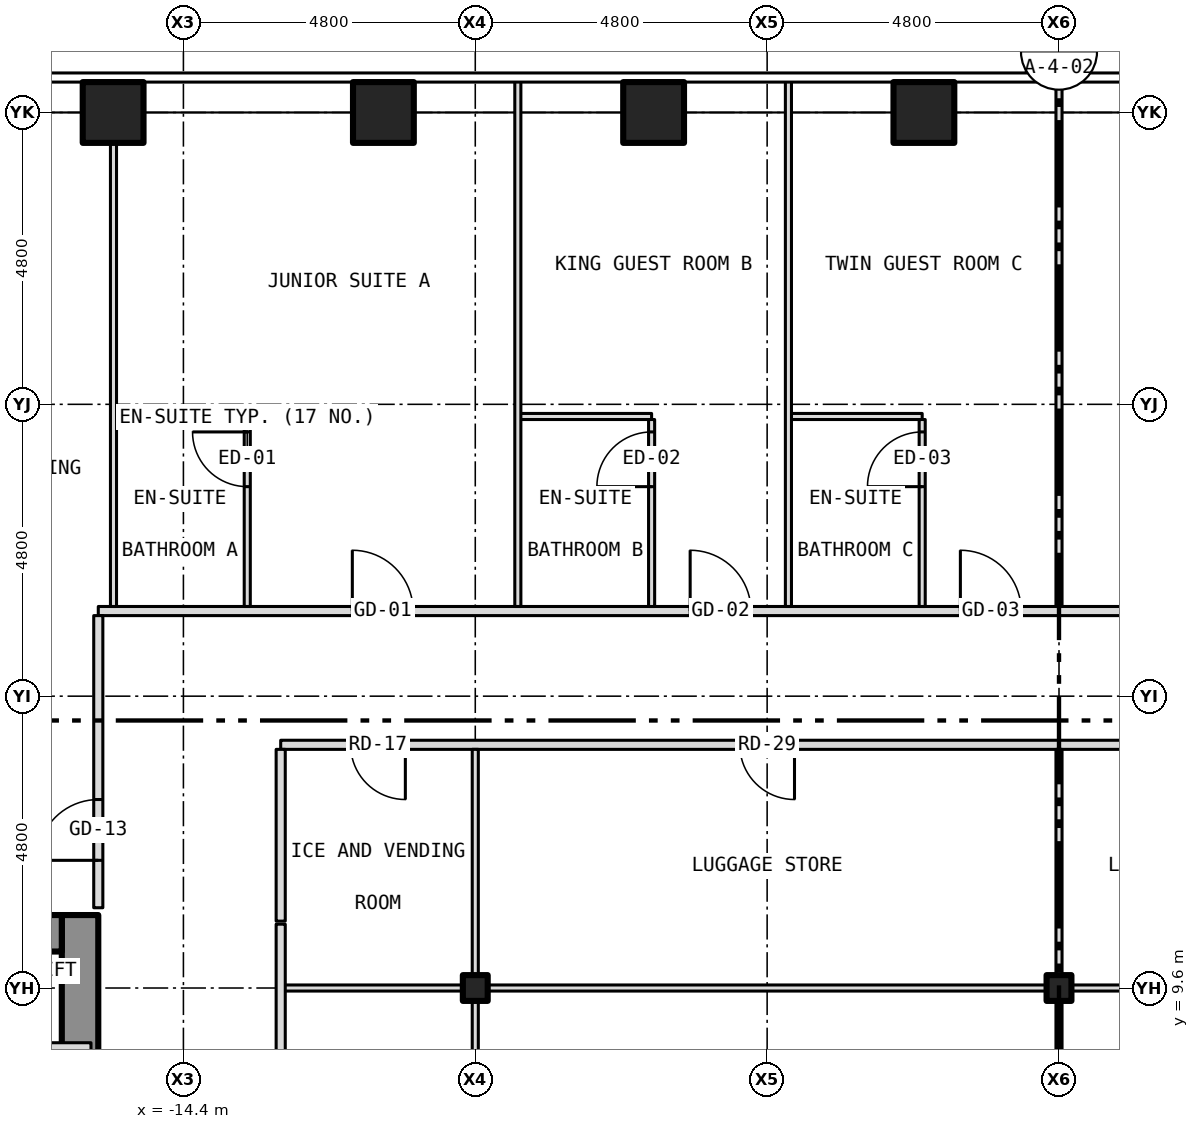
"""IFC4 building model, lengths in metres.
Left out: names, types, materials, properties, quantities, classifications, styles, units other than length and angle.
Written with IfcOpenShell. Run it as: python <this file> out.ifc"""

import sys

from ifc_helpers import new_model, si_unit, direction, frame, frame_2d, origin, origin_2d, place, context, subcontext, project, spatial, rectangle, hollow_rectangle, i_section, extrude, element, fill, save


model = new_model("IFC4")
c1 = context("Model", 3, precision=1e-05, world=origin(), true_north=direction((0.0, 1.0)))
c2 = subcontext(c1, "Body", "Model", "MODEL_VIEW")
j1 = project(units=[si_unit("LENGTHUNIT", "METRE"), si_unit("PLANEANGLEUNIT", "RADIAN")], contexts=[c1])
p1 = place(None, origin())
s1 = spatial("IfcSite", under=j1, at=p1, CompositionType="ELEMENT")
p2 = place(p1, origin())
s2 = spatial("IfcBuilding", under=s1, at=p2, CompositionType="ELEMENT")
p3 = place(p2, frame((0.0, 0.0, 56.5)))
s3 = spatial("IfcBuildingStorey", under=s2, at=p3, CompositionType="ELEMENT", Elevation=56.5)
for number, where, z_axis, x_axis in (
    (1, (-15.556, 24.0, -0.15), (0.0, 0.0, 1.0), (1.0, 0.0, 0.0)),
    (2, (-11.111, 24.0, -0.15), (0.0, 0.0, 1.0), (1.0, 0.0, 0.0)),
    (3, (-6.667, 24.0, -0.15), (0.0, 0.0, 1.0), (1.0, 0.0, 0.0)),
    (4, (-2.222, 24.0, -0.15), (0.0, 0.0, 1.0), (1.0, 0.0, 0.0)),
):
    element("IfcColumn", number, at=place(p3, frame(where, z_axis=z_axis, x_axis=x_axis)), inside=s3, PredefinedType="COLUMN", context=c2, shape_type="SweptSolid", body=[
        extrude(hollow_rectangle(XDim=1.0, YDim=1.0, WallThickness=0.06, at=origin_2d()), origin(), (0.0, 0.0, 1.0), 3.5),
    ])
for number, where, z_axis, x_axis in (
    (5, (-9.6, 9.6, -0.15), (0.0, 0.0, 1.0), (1.0, 0.0, 0.0)),
    (6, (0.0, 9.6, -0.15), (0.0, 0.0, 1.0), (1.0, 0.0, 0.0)),
):
    element("IfcColumn", number, at=place(p3, frame(where, z_axis=z_axis, x_axis=x_axis)), inside=s3, PredefinedType="COLUMN", context=c2, shape_type="SweptSolid", body=[
        extrude(i_section(OverallWidth=0.409, OverallDepth=0.424, WebThickness=0.033, FlangeThickness=0.052, at=origin_2d()), origin(), (0.0, 0.0, 1.0), 3.5),
    ])
p4 = place(p3, frame((-16.1, -10.8, 0.0), z_axis=(0.0, 0.0, 1.0), x_axis=(0.0, 1.0, 0.0)))
e7 = element("IfcWall", 7, at=p4, inside=s3, PredefinedType="SHEAR", context=c2, shape_type="SweptSolid", body=[
    extrude(rectangle(XDim=21.6, YDim=0.6, at=frame_2d((10.8, 0.0))), origin(), (0.0, 0.0, 1.0), 3.25),
])
p5 = place(p4, frame((9.4, 0.0, 0.0)))
e8 = element("IfcOpeningElement", 8, at=p5, cuts=e7, PredefinedType="OPENING", context=c2, shape_type="SweptSolid", body=[
    extrude(rectangle(XDim=1.1, YDim=2.1, at=frame_2d((0.55, 1.05))), frame((0.0, 0.312, 0.0), z_axis=(0.0, -1.0, 0.0), x_axis=(1.0, 0.0, 0.0)), (0.0, 0.0, 1.0), 0.624),
])
p6 = place(p4, frame((11.5, 0.0, 0.0)))
e9 = element("IfcOpeningElement", 9, at=p6, cuts=e7, PredefinedType="OPENING", context=c2, shape_type="SweptSolid", body=[
    extrude(rectangle(XDim=1.1, YDim=2.1, at=frame_2d((0.55, 1.05))), frame((0.0, 0.312, 0.0), z_axis=(0.0, -1.0, 0.0), x_axis=(1.0, 0.0, 0.0)), (0.0, 0.0, 1.0), 0.624),
])
p7 = place(p4, frame((13.6, 0.0, 0.0)))
e10 = element("IfcOpeningElement", 10, at=p7, cuts=e7, PredefinedType="OPENING", context=c2, shape_type="SweptSolid", body=[
    extrude(rectangle(XDim=1.1, YDim=2.1, at=frame_2d((0.55, 1.05))), frame((0.0, 0.312, 0.0), z_axis=(0.0, -1.0, 0.0), x_axis=(1.0, 0.0, 0.0)), (0.0, 0.0, 1.0), 0.624),
])
p8 = place(p4, frame((15.7, 0.0, 0.0)))
e11 = element("IfcOpeningElement", 11, at=p8, cuts=e7, PredefinedType="OPENING", context=c2, shape_type="SweptSolid", body=[
    extrude(rectangle(XDim=1.1, YDim=2.1, at=frame_2d((0.55, 1.05))), frame((0.0, 0.312, 0.0), z_axis=(0.0, -1.0, 0.0), x_axis=(1.0, 0.0, 0.0)), (0.0, 0.0, 1.0), 0.624),
])
p9 = place(p4, frame((17.8, 0.0, 0.0)))
e12 = element("IfcOpeningElement", 12, at=p9, cuts=e7, PredefinedType="OPENING", context=c2, shape_type="SweptSolid", body=[
    extrude(rectangle(XDim=1.1, YDim=2.1, at=frame_2d((0.55, 1.05))), frame((0.0, 0.312, 0.0), z_axis=(0.0, -1.0, 0.0), x_axis=(1.0, 0.0, 0.0)), (0.0, 0.0, 1.0), 0.624),
])
p10 = place(p4, frame((0.758, 0.0, 0.0)))
e13 = element("IfcOpeningElement", 13, at=p10, cuts=e7, PredefinedType="OPENING", context=c2, shape_type="SweptSolid", body=[
    extrude(rectangle(XDim=1.1, YDim=2.1, at=frame_2d((0.55, 1.05))), frame((0.0, 0.312, 0.0), z_axis=(0.0, -1.0, 0.0), x_axis=(1.0, 0.0, 0.0)), (0.0, 0.0, 1.0), 0.624),
])
p11 = place(p4, frame((7.5, 0.0, 0.0)))
e14 = element("IfcOpeningElement", 14, at=p11, cuts=e7, PredefinedType="OPENING", context=c2, shape_type="SweptSolid", body=[
    extrude(rectangle(XDim=1.1, YDim=2.1, at=frame_2d((0.55, 1.05))), frame((0.0, 0.312, 0.0), z_axis=(0.0, -1.0, 0.0), x_axis=(1.0, 0.0, 0.0)), (0.0, 0.0, 1.0), 0.624),
])
p12 = place(p3, frame((-23.4, 10.5, 0.0), z_axis=(0.0, 0.0, 1.0), x_axis=(1.0, 0.0, 0.0)))
e15 = element("IfcWall", 15, at=p12, inside=s3, PredefinedType="SHEAR", context=c2, shape_type="SweptSolid", body=[
    extrude(rectangle(XDim=7.0, YDim=0.6, at=frame_2d((3.5, 0.0))), origin(), (0.0, 0.0, 1.0), 3.25),
])
p13 = place(p3, frame((-18.8, 8.6, 0.0), z_axis=(0.0, 0.0, 1.0), x_axis=(1.0, 0.0, 0.0)))
e16 = element("IfcWall", 16, at=p13, inside=s3, PredefinedType="PARTITIONING", context=c2, shape_type="SweptSolid", body=[
    extrude(rectangle(XDim=2.88, YDim=0.2, at=frame_2d((1.44, 0.0))), origin(), (0.0, 0.0, 1.0), 3.25),
])
p14 = place(p3, frame((-12.8, 9.6, 0.0), z_axis=(0.0, 0.0, 1.0), x_axis=(1.0, 0.0, 0.0)))
e17 = element("IfcWall", 17, at=p14, inside=s3, PredefinedType="PARTITIONING", context=c2, shape_type="SweptSolid", body=[
    extrude(rectangle(XDim=2.996, YDim=0.1, at=frame_2d((1.498, 0.0))), origin(), (0.0, 0.0, 1.0), 2.728),
])
p15 = place(p3, frame((-9.804, 9.6, 0.0), z_axis=(0.0, 0.0, 1.0), x_axis=(1.0, 0.0, 0.0)))
e18 = element("IfcWall", 18, at=p15, inside=s3, PredefinedType="PARTITIONING", context=c2, shape_type="SweptSolid", body=[
    extrude(rectangle(XDim=0.408, YDim=0.1, at=frame_2d((0.204, 0.0))), origin(), (0.0, 0.0, 1.0), 3.35),
])
p16 = place(p3, frame((-9.396, 9.6, 0.0), z_axis=(0.0, 0.0, 1.0), x_axis=(1.0, 0.0, 0.0)))
e19 = element("IfcWall", 19, at=p16, inside=s3, PredefinedType="PARTITIONING", context=c2, shape_type="SweptSolid", body=[
    extrude(rectangle(XDim=9.192, YDim=0.1, at=frame_2d((4.596, 0.0))), origin(), (0.0, 0.0, 1.0), 2.728),
])
p17 = place(p3, frame((-0.204, 9.6, 0.0), z_axis=(0.0, 0.0, 1.0), x_axis=(1.0, 0.0, 0.0)))
e20 = element("IfcWall", 20, at=p17, inside=s3, PredefinedType="PARTITIONING", context=c2, shape_type="SweptSolid", body=[
    extrude(rectangle(XDim=0.408, YDim=0.1, at=frame_2d((0.204, 0.0))), origin(), (0.0, 0.0, 1.0), 3.35),
])
p18 = place(p3, frame((0.204, 9.6, 0.0), z_axis=(0.0, 0.0, 1.0), x_axis=(1.0, 0.0, 0.0)))
e21 = element("IfcWall", 21, at=p18, inside=s3, PredefinedType="PARTITIONING", context=c2, shape_type="SweptSolid", body=[
    extrude(rectangle(XDim=3.896, YDim=0.1, at=frame_2d((1.948, 0.0))), origin(), (0.0, 0.0, 1.0), 2.728),
])
p19 = place(p3, frame((-12.8, 13.6, 0.0), z_axis=(0.0, 0.0, 1.0), x_axis=(1.0, 0.0, 0.0)))
e22 = element("IfcWall", 22, at=p19, inside=s3, PredefinedType="PARTITIONING", context=c2, shape_type="SweptSolid", body=[
    extrude(rectangle(XDim=16.9, YDim=0.15, at=frame_2d((8.45, 0.0))), origin(), (0.0, 0.0, 1.0), 3.35),
])
p20 = place(p19, frame((1.15, 0.0, 0.0)))
e23 = element("IfcOpeningElement", 23, at=p20, cuts=e22, PredefinedType="OPENING", context=c2, shape_type="SweptSolid", body=[
    extrude(rectangle(XDim=0.9, YDim=2.1, at=frame_2d((0.45, 1.05))), frame((0.0, 0.087, 0.0), z_axis=(0.0, -1.0, 0.0), x_axis=(1.0, 0.0, 0.0)), (0.0, 0.0, 1.0), 0.174),
])
p21 = place(p19, frame((14.4, 0.0, 0.0)))
e24 = element("IfcOpeningElement", 24, at=p21, cuts=e22, PredefinedType="OPENING", context=c2, shape_type="SweptSolid", body=[
    extrude(rectangle(XDim=0.9, YDim=2.1, at=frame_2d((0.45, 1.05))), frame((0.0, 0.087, 0.0), z_axis=(0.0, -1.0, 0.0), x_axis=(1.0, 0.0, 0.0)), (0.0, 0.0, 1.0), 0.174),
])
p22 = place(p19, frame((7.55, 0.0, 0.0)))
e25 = element("IfcOpeningElement", 25, at=p22, cuts=e22, PredefinedType="OPENING", context=c2, shape_type="SweptSolid", body=[
    extrude(rectangle(XDim=0.9, YDim=2.1, at=frame_2d((0.45, 1.05))), frame((0.0, 0.087, 0.0), z_axis=(0.0, -1.0, 0.0), x_axis=(1.0, 0.0, 0.0)), (0.0, 0.0, 1.0), 0.174),
])
p23 = place(p3, frame((-15.8, 15.8, 0.0), z_axis=(0.0, 0.0, 1.0), x_axis=(1.0, 0.0, 0.0)))
e26 = element("IfcWall", 26, at=p23, inside=s3, PredefinedType="PARTITIONING", context=c2, shape_type="SweptSolid", body=[
    extrude(rectangle(XDim=31.6, YDim=0.15, at=frame_2d((15.8, 0.0))), origin(), (0.0, 0.0, 1.0), 3.35),
])
p24 = place(p23, frame((4.178, 0.0, 0.0)))
e27 = element("IfcOpeningElement", 27, at=p24, cuts=e26, PredefinedType="OPENING", context=c2, shape_type="SweptSolid", body=[
    extrude(rectangle(XDim=1.0, YDim=2.1, at=frame_2d((0.5, 1.05))), frame((0.0, 0.087, 0.0), z_axis=(0.0, -1.0, 0.0), x_axis=(1.0, 0.0, 0.0)), (0.0, 0.0, 1.0), 0.174),
])
p25 = place(p23, frame((9.734, 0.0, 0.0)))
e28 = element("IfcOpeningElement", 28, at=p25, cuts=e26, PredefinedType="OPENING", context=c2, shape_type="SweptSolid", body=[
    extrude(rectangle(XDim=1.0, YDim=2.1, at=frame_2d((0.5, 1.05))), frame((0.0, 0.087, 0.0), z_axis=(0.0, -1.0, 0.0), x_axis=(1.0, 0.0, 0.0)), (0.0, 0.0, 1.0), 0.174),
])
p26 = place(p23, frame((14.178, 0.0, 0.0)))
e29 = element("IfcOpeningElement", 29, at=p26, cuts=e26, PredefinedType="OPENING", context=c2, shape_type="SweptSolid", body=[
    extrude(rectangle(XDim=1.0, YDim=2.1, at=frame_2d((0.5, 1.05))), frame((0.0, 0.087, 0.0), z_axis=(0.0, -1.0, 0.0), x_axis=(1.0, 0.0, 0.0)), (0.0, 0.0, 1.0), 0.174),
])
p27 = place(p23, frame((17.534, 0.0, 0.0)))
e30 = element("IfcOpeningElement", 30, at=p27, cuts=e26, PredefinedType="OPENING", context=c2, shape_type="SweptSolid", body=[
    extrude(rectangle(XDim=1.0, YDim=2.1, at=frame_2d((0.5, 1.05))), frame((0.0, 0.087, 0.0), z_axis=(0.0, -1.0, 0.0), x_axis=(1.0, 0.0, 0.0)), (0.0, 0.0, 1.0), 0.174),
])
p28 = place(p23, frame((25.289, 0.0, 0.0)))
e31 = element("IfcOpeningElement", 31, at=p28, cuts=e26, PredefinedType="OPENING", context=c2, shape_type="SweptSolid", body=[
    extrude(rectangle(XDim=1.0, YDim=2.1, at=frame_2d((0.5, 1.05))), frame((0.0, 0.087, 0.0), z_axis=(0.0, -1.0, 0.0), x_axis=(1.0, 0.0, 0.0)), (0.0, 0.0, 1.0), 0.174),
])
p29 = place(p23, frame((29.733, 0.0, 0.0)))
e32 = element("IfcOpeningElement", 32, at=p29, cuts=e26, PredefinedType="OPENING", context=c2, shape_type="SweptSolid", body=[
    extrude(rectangle(XDim=1.0, YDim=2.1, at=frame_2d((0.5, 1.05))), frame((0.0, 0.087, 0.0), z_axis=(0.0, -1.0, 0.0), x_axis=(1.0, 0.0, 0.0)), (0.0, 0.0, 1.0), 0.174),
])
for number, where, z_axis, x_axis in (
    (33, (-15.55, 19.0, 0.0), (0.0, 0.0, 1.0), (1.0, 0.0, 0.0)),
    (34, (-8.9, 19.0, 0.0), (0.0, 0.0, 1.0), (1.0, 0.0, 0.0)),
    (35, (-4.45, 19.0, 0.0), (0.0, 0.0, 1.0), (1.0, 0.0, 0.0)),
):
    element("IfcWall", number, at=place(p3, frame(where, z_axis=z_axis, x_axis=x_axis)), inside=s3, PredefinedType="PARTITIONING", context=c2, shape_type="SweptSolid", body=[
        extrude(rectangle(XDim=2.2, YDim=0.1, at=frame_2d((1.1, 0.0))), origin(), (0.0, 0.0, 1.0), 3.35),
    ])
p30 = place(p3, frame((-15.8, 10.92, 0.0), z_axis=(0.0, 0.0, 1.0), x_axis=(0.0, 1.0, 0.0)))
e36 = element("IfcWall", 36, at=p30, inside=s3, PredefinedType="PARTITIONING", context=c2, shape_type="SweptSolid", body=[
    extrude(rectangle(XDim=4.805, YDim=0.15, at=frame_2d((2.403, 0.0))), origin(), (0.0, 0.0, 1.0), 3.35),
])
p31 = place(p30, frame((0.78, 0.0, 0.0)))
e37 = element("IfcOpeningElement", 37, at=p31, cuts=e36, PredefinedType="OPENING", context=c2, shape_type="SweptSolid", body=[
    extrude(rectangle(XDim=1.0, YDim=2.1, at=frame_2d((0.5, 1.05))), frame((0.0, 0.087, 0.0), z_axis=(0.0, -1.0, 0.0), x_axis=(1.0, 0.0, 0.0)), (0.0, 0.0, 1.0), 0.174),
])
p32 = place(p3, frame((-15.55, 15.875, 0.0), z_axis=(0.0, 0.0, 1.0), x_axis=(0.0, 1.0, 0.0)))
e38 = element("IfcWall", 38, at=p32, inside=s3, PredefinedType="PARTITIONING", context=c2, shape_type="SweptSolid", body=[
    extrude(rectangle(XDim=8.005, YDim=0.1, at=frame_2d((4.002, 0.0))), origin(), (0.0, 0.0, 1.0), 3.35),
])
p33 = place(p3, frame((-13.35, 15.875, 0.0), z_axis=(0.0, 0.0, 1.0), x_axis=(0.0, 1.0, 0.0)))
e39 = element("IfcWall", 39, at=p33, inside=s3, PredefinedType="PARTITIONING", context=c2, shape_type="SweptSolid", body=[
    extrude(rectangle(XDim=3.075, YDim=0.1, at=frame_2d((1.538, 0.0))), origin(), (0.0, 0.0, 1.0), 3.35),
])
p34 = place(p33, frame((1.971, 0.0, 0.0)))
e40 = element("IfcOpeningElement", 40, at=p34, cuts=e39, PredefinedType="OPENING", context=c2, shape_type="SweptSolid", body=[
    extrude(rectangle(XDim=0.9, YDim=2.1, at=frame_2d((0.45, 1.05))), frame((0.0, 0.062, 0.0), z_axis=(0.0, -1.0, 0.0), x_axis=(1.0, 0.0, 0.0)), (0.0, 0.0, 1.0), 0.124),
])
p35 = place(p3, frame((-12.8, 6.35, 0.0), z_axis=(0.0, 0.0, 1.0), x_axis=(0.0, 1.0, 0.0)))
e41 = element("IfcWall", 41, at=p35, inside=s3, PredefinedType="PARTITIONING", context=c2, shape_type="SweptSolid", body=[
    extrude(rectangle(XDim=4.3, YDim=0.15, at=frame_2d((2.15, 0.0))), origin(), (0.0, 0.0, 1.0), 3.35),
])
p36 = place(p35, frame((1.15, 0.0, 0.0)))
e42 = element("IfcOpeningElement", 42, at=p36, cuts=e41, PredefinedType="OPENING", context=c2, shape_type="SweptSolid", body=[
    extrude(rectangle(XDim=0.9, YDim=2.1, at=frame_2d((0.45, 1.05))), frame((0.0, 0.087, 0.0), z_axis=(0.0, -1.0, 0.0), x_axis=(1.0, 0.0, 0.0)), (0.0, 0.0, 1.0), 0.174),
])
p37 = place(p3, frame((-12.8, 10.7, 0.0), z_axis=(0.0, 0.0, 1.0), x_axis=(0.0, 1.0, 0.0)))
e43 = element("IfcWall", 43, at=p37, inside=s3, PredefinedType="PARTITIONING", context=c2, shape_type="SweptSolid", body=[
    extrude(rectangle(XDim=2.825, YDim=0.15, at=frame_2d((1.413, 0.0))), origin(), (0.0, 0.0, 1.0), 3.35),
])
p38 = place(p3, frame((-9.6, 6.375, 0.0), z_axis=(0.0, 0.0, 1.0), x_axis=(0.0, 1.0, 0.0)))
e44 = element("IfcWall", 44, at=p38, inside=s3, PredefinedType="PARTITIONING", context=c2, shape_type="SweptSolid", body=[
    extrude(rectangle(XDim=3.175, YDim=0.1, at=frame_2d((1.587, 0.0))), origin(), (0.0, 0.0, 1.0), 2.728),
])
p39 = place(p3, frame((-9.6, 9.65, 0.0), z_axis=(0.0, 0.0, 1.0), x_axis=(0.0, 1.0, 0.0)))
e45 = element("IfcWall", 45, at=p39, inside=s3, PredefinedType="PARTITIONING", context=c2, shape_type="SweptSolid", body=[
    extrude(rectangle(XDim=3.875, YDim=0.1, at=frame_2d((1.938, 0.0))), origin(), (0.0, 0.0, 1.0), 2.728),
])
p40 = place(p3, frame((-8.9, 15.875, 0.0), z_axis=(0.0, 0.0, 1.0), x_axis=(0.0, 1.0, 0.0)))
e46 = element("IfcWall", 46, at=p40, inside=s3, PredefinedType="PARTITIONING", context=c2, shape_type="SweptSolid", body=[
    extrude(rectangle(XDim=8.655, YDim=0.1, at=frame_2d((4.328, 0.0))), origin(), (0.0, 0.0, 1.0), 3.35),
])
p41 = place(p3, frame((-6.7, 15.875, 0.0), z_axis=(0.0, 0.0, 1.0), x_axis=(0.0, 1.0, 0.0)))
e47 = element("IfcWall", 47, at=p41, inside=s3, PredefinedType="PARTITIONING", context=c2, shape_type="SweptSolid", body=[
    extrude(rectangle(XDim=3.075, YDim=0.1, at=frame_2d((1.538, 0.0))), origin(), (0.0, 0.0, 1.0), 3.35),
])
p42 = place(p41, frame((1.971, 0.0, 0.0)))
e48 = element("IfcOpeningElement", 48, at=p42, cuts=e47, PredefinedType="OPENING", context=c2, shape_type="SweptSolid", body=[
    extrude(rectangle(XDim=0.9, YDim=2.1, at=frame_2d((0.45, 1.05))), frame((0.0, 0.062, 0.0), z_axis=(0.0, -1.0, 0.0), x_axis=(1.0, 0.0, 0.0)), (0.0, 0.0, 1.0), 0.124),
])
p43 = place(p3, frame((-4.45, 15.875, 0.0), z_axis=(0.0, 0.0, 1.0), x_axis=(0.0, 1.0, 0.0)))
e49 = element("IfcWall", 49, at=p43, inside=s3, PredefinedType="PARTITIONING", context=c2, shape_type="SweptSolid", body=[
    extrude(rectangle(XDim=8.655, YDim=0.1, at=frame_2d((4.328, 0.0))), origin(), (0.0, 0.0, 1.0), 3.35),
])
p44 = place(p3, frame((-2.25, 15.875, 0.0), z_axis=(0.0, 0.0, 1.0), x_axis=(0.0, 1.0, 0.0)))
e50 = element("IfcWall", 50, at=p44, inside=s3, PredefinedType="PARTITIONING", context=c2, shape_type="SweptSolid", body=[
    extrude(rectangle(XDim=3.075, YDim=0.1, at=frame_2d((1.538, 0.0))), origin(), (0.0, 0.0, 1.0), 3.35),
])
p45 = place(p44, frame((1.971, 0.0, 0.0)))
e51 = element("IfcOpeningElement", 51, at=p45, cuts=e50, PredefinedType="OPENING", context=c2, shape_type="SweptSolid", body=[
    extrude(rectangle(XDim=0.9, YDim=2.1, at=frame_2d((0.45, 1.05))), frame((0.0, 0.062, 0.0), z_axis=(0.0, -1.0, 0.0), x_axis=(1.0, 0.0, 0.0)), (0.0, 0.0, 1.0), 0.124),
])
p46 = place(p3, frame((0.0, 6.375, 0.0), z_axis=(0.0, 0.0, 1.0), x_axis=(0.0, 1.0, 0.0)))
e52 = element("IfcWall", 52, at=p46, inside=s3, PredefinedType="PARTITIONING", context=c2, shape_type="SweptSolid", body=[
    extrude(rectangle(XDim=3.175, YDim=0.1, at=frame_2d((1.587, 0.0))), origin(), (0.0, 0.0, 1.0), 2.728),
])
p47 = place(p3, frame((0.0, 9.65, 0.0), z_axis=(0.0, 0.0, 1.0), x_axis=(0.0, 1.0, 0.0)))
e53 = element("IfcWall", 53, at=p47, inside=s3, PredefinedType="PARTITIONING", context=c2, shape_type="SweptSolid", body=[
    extrude(rectangle(XDim=3.875, YDim=0.1, at=frame_2d((1.938, 0.0))), origin(), (0.0, 0.0, 1.0), 2.728),
])
p48 = place(p3, frame((0.0, 15.875, 0.0), z_axis=(0.0, 0.0, 1.0), x_axis=(0.0, 1.0, 0.0)))
e54 = element("IfcWall", 54, at=p48, inside=s3, PredefinedType="PARTITIONING", context=c2, shape_type="SweptSolid", body=[
    extrude(rectangle(XDim=8.655, YDim=0.1, at=frame_2d((4.328, 0.0))), origin(), (0.0, 0.0, 1.0), 2.728),
])
p49 = place(p24, origin())
e55 = element("IfcDoor", 55, at=p49, inside=s3, OperationType="SINGLE_SWING_LEFT", PredefinedType="DOOR", context=c2, shape_type="SweptSolid", body=[
    extrude(rectangle(XDim=1.0, YDim=2.1, at=frame_2d((0.5, 1.05))), frame((0.0, 0.025, 0.0), z_axis=(0.0, -1.0, 0.0), x_axis=(1.0, 0.0, 0.0)), (0.0, 0.0, 1.0), 0.05),
])
fill(e27, e55)
p50 = place(p34, origin())
e56 = element("IfcDoor", 56, at=p50, inside=s3, OperationType="SINGLE_SWING_RIGHT", PredefinedType="DOOR", context=c2, shape_type="SweptSolid", body=[
    extrude(rectangle(XDim=0.9, YDim=2.1, at=frame_2d((0.45, 1.05))), frame((0.0, 0.025, 0.0), z_axis=(0.0, -1.0, 0.0), x_axis=(1.0, 0.0, 0.0)), (0.0, 0.0, 1.0), 0.05),
])
fill(e40, e56)
p51 = place(p25, origin())
e57 = element("IfcDoor", 57, at=p51, inside=s3, OperationType="SINGLE_SWING_LEFT", PredefinedType="DOOR", context=c2, shape_type="SweptSolid", body=[
    extrude(rectangle(XDim=1.0, YDim=2.1, at=frame_2d((0.5, 1.05))), frame((0.0, 0.025, 0.0), z_axis=(0.0, -1.0, 0.0), x_axis=(1.0, 0.0, 0.0)), (0.0, 0.0, 1.0), 0.05),
])
fill(e28, e57)
p52 = place(p42, origin())
e58 = element("IfcDoor", 58, at=p52, inside=s3, OperationType="SINGLE_SWING_LEFT", PredefinedType="DOOR", context=c2, shape_type="SweptSolid", body=[
    extrude(rectangle(XDim=0.9, YDim=2.1, at=frame_2d((0.45, 1.05))), frame((0.0, 0.025, 0.0), z_axis=(0.0, -1.0, 0.0), x_axis=(1.0, 0.0, 0.0)), (0.0, 0.0, 1.0), 0.05),
])
fill(e48, e58)
p53 = place(p26, origin())
e59 = element("IfcDoor", 59, at=p53, inside=s3, OperationType="SINGLE_SWING_LEFT", PredefinedType="DOOR", context=c2, shape_type="SweptSolid", body=[
    extrude(rectangle(XDim=1.0, YDim=2.1, at=frame_2d((0.5, 1.05))), frame((0.0, 0.025, 0.0), z_axis=(0.0, -1.0, 0.0), x_axis=(1.0, 0.0, 0.0)), (0.0, 0.0, 1.0), 0.05),
])
fill(e29, e59)
p54 = place(p45, origin())
e60 = element("IfcDoor", 60, at=p54, inside=s3, OperationType="SINGLE_SWING_LEFT", PredefinedType="DOOR", context=c2, shape_type="SweptSolid", body=[
    extrude(rectangle(XDim=0.9, YDim=2.1, at=frame_2d((0.45, 1.05))), frame((0.0, 0.025, 0.0), z_axis=(0.0, -1.0, 0.0), x_axis=(1.0, 0.0, 0.0)), (0.0, 0.0, 1.0), 0.05),
])
fill(e51, e60)
p55 = place(p31, origin())
e61 = element("IfcDoor", 61, at=p55, inside=s3, OperationType="SINGLE_SWING_LEFT", PredefinedType="DOOR", context=c2, shape_type="SweptSolid", body=[
    extrude(rectangle(XDim=1.0, YDim=2.1, at=frame_2d((0.5, 1.05))), frame((0.0, 0.025, 0.0), z_axis=(0.0, -1.0, 0.0), x_axis=(1.0, 0.0, 0.0)), (0.0, 0.0, 1.0), 0.05),
])
fill(e37, e61)
p56 = place(p20, origin())
e62 = element("IfcDoor", 62, at=p56, inside=s3, OperationType="SINGLE_SWING_RIGHT", PredefinedType="DOOR", context=c2, shape_type="SweptSolid", body=[
    extrude(rectangle(XDim=0.9, YDim=2.1, at=frame_2d((0.45, 1.05))), frame((0.0, 0.025, 0.0), z_axis=(0.0, -1.0, 0.0), x_axis=(1.0, 0.0, 0.0)), (0.0, 0.0, 1.0), 0.05),
])
fill(e23, e62)
p57 = place(p22, origin())
e63 = element("IfcDoor", 63, at=p57, inside=s3, OperationType="SINGLE_SWING_RIGHT", PredefinedType="DOOR", context=c2, shape_type="SweptSolid", body=[
    extrude(rectangle(XDim=0.9, YDim=2.1, at=frame_2d((0.45, 1.05))), frame((0.0, 0.025, 0.0), z_axis=(0.0, -1.0, 0.0), x_axis=(1.0, 0.0, 0.0)), (0.0, 0.0, 1.0), 0.05),
])
fill(e25, e63)
save(model, sys.argv[1])
